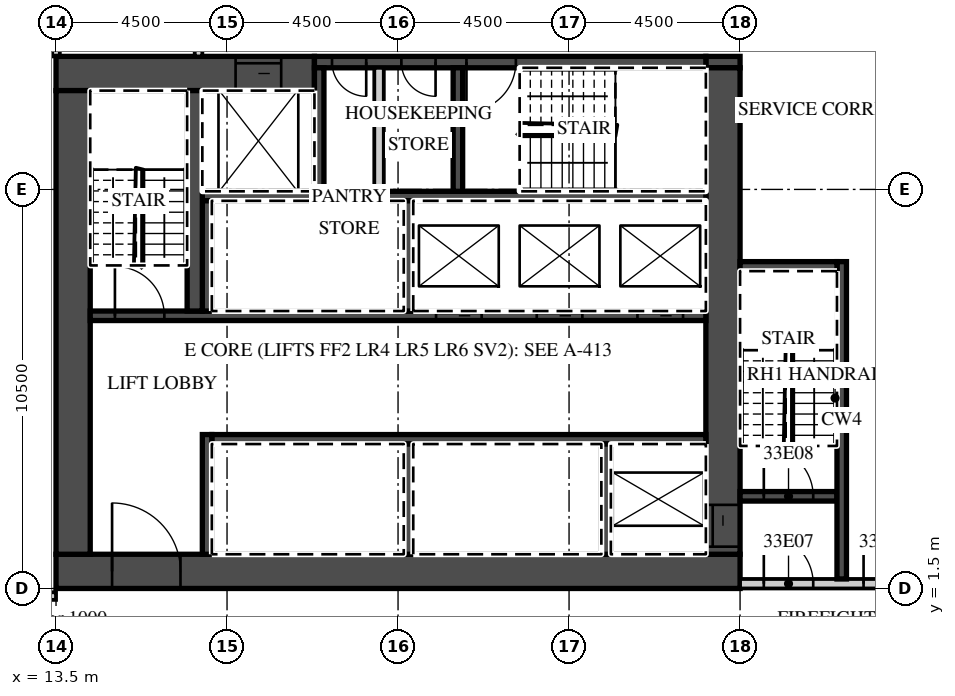
"""IFC4 building model, lengths in metres.
Left out: names, types, materials, properties, quantities, classifications, styles, units other than length and angle.
Written with IfcOpenShell. Run it as: python <this file> out.ifc"""

import sys

from ifc_helpers import new_model, si_unit, direction, frame, frame_2d, origin, place, context, subcontext, project, spatial, rectangle, extrude, element, fill, save


model = new_model("IFC4")
c1 = context("Model", 3, precision=1e-05, world=origin(), true_north=direction((0.0, 1.0)))
c2 = subcontext(c1, "Body", "Model", "MODEL_VIEW")
j1 = project(units=[si_unit("LENGTHUNIT", "METRE"), si_unit("PLANEANGLEUNIT", "RADIAN")], contexts=[c1])
p1 = place(None, origin())
s1 = spatial("IfcSite", under=j1, at=p1, CompositionType="ELEMENT")
p2 = place(p1, origin())
s2 = spatial("IfcBuilding", under=s1, at=p2, CompositionType="ELEMENT")
p3 = place(p2, frame((0.0, 0.0, 143.8)))
s3 = spatial("IfcBuildingStorey", under=s2, at=p3, CompositionType="ELEMENT", Elevation=143.8)
p4 = place(p3, frame((13.5, 15.5, 0.0), z_axis=(0.0, 0.0, 1.0), x_axis=(0.0, 1.0, 0.0)))
e1 = element("IfcWall", 1, at=p4, inside=s3, PredefinedType="PARTITIONING", context=c2, shape_type="SweptSolid", body=[
    extrude(rectangle(XDim=7.162, YDim=0.2, at=frame_2d((3.581, 0.0))), origin(), (0.0, 0.0, 1.0), 3.02),
])
p5 = place(p3, frame((-39.316, 1.3, 0.0), z_axis=(0.0, 0.0, 1.0), x_axis=(1.0, 0.0, 0.0)))
e2 = element("IfcWall", 2, at=p5, inside=s3, PredefinedType="PARTITIONING", context=c2, shape_type="SweptSolid", body=[
    extrude(rectangle(XDim=52.816, YDim=0.2, at=frame_2d((26.408, 0.0))), origin(), (0.0, 0.0, 1.0), 3.02),
])
p6 = place(p5, frame((0.15, 0.0, 0.0)))
e3 = element("IfcOpeningElement", 3, at=p6, cuts=e2, PredefinedType="OPENING", context=c2, shape_type="SweptSolid", body=[
    extrude(rectangle(XDim=0.9, YDim=2.1, at=frame_2d((0.45, 1.05))), frame((0.0, 0.11, 0.0), z_axis=(0.0, -1.0, 0.0), x_axis=(1.0, 0.0, 0.0)), (0.0, 0.0, 1.0), 0.22),
])
p7 = place(p5, frame((5.754, 0.0, 0.0)))
e4 = element("IfcOpeningElement", 4, at=p7, cuts=e2, PredefinedType="OPENING", context=c2, shape_type="SweptSolid", body=[
    extrude(rectangle(XDim=1.2, YDim=2.1, at=frame_2d((0.6, 1.05))), frame((0.0, 0.11, 0.0), z_axis=(0.0, -1.0, 0.0), x_axis=(1.0, 0.0, 0.0)), (0.0, 0.0, 1.0), 0.22),
])
p8 = place(p5, frame((14.754, 0.0, 0.0)))
e5 = element("IfcOpeningElement", 5, at=p8, cuts=e2, PredefinedType="OPENING", context=c2, shape_type="SweptSolid", body=[
    extrude(rectangle(XDim=1.2, YDim=2.1, at=frame_2d((0.6, 1.05))), frame((0.0, 0.11, 0.0), z_axis=(0.0, -1.0, 0.0), x_axis=(1.0, 0.0, 0.0)), (0.0, 0.0, 1.0), 0.22),
])
p9 = place(p5, frame((23.754, 0.0, 0.0)))
e6 = element("IfcOpeningElement", 6, at=p9, cuts=e2, PredefinedType="OPENING", context=c2, shape_type="SweptSolid", body=[
    extrude(rectangle(XDim=1.2, YDim=2.1, at=frame_2d((0.6, 1.05))), frame((0.0, 0.11, 0.0), z_axis=(0.0, -1.0, 0.0), x_axis=(1.0, 0.0, 0.0)), (0.0, 0.0, 1.0), 0.22),
])
p10 = place(p5, frame((35.678, 0.0, 0.0)))
e7 = element("IfcOpeningElement", 7, at=p10, cuts=e2, PredefinedType="OPENING", context=c2, shape_type="SweptSolid", body=[
    extrude(rectangle(XDim=1.2, YDim=2.1, at=frame_2d((0.6, 1.05))), frame((0.0, 0.11, 0.0), z_axis=(0.0, -1.0, 0.0), x_axis=(1.0, 0.0, 0.0)), (0.0, 0.0, 1.0), 0.22),
])
p11 = place(p5, frame((44.678, 0.0, 0.0)))
e8 = element("IfcOpeningElement", 8, at=p11, cuts=e2, PredefinedType="OPENING", context=c2, shape_type="SweptSolid", body=[
    extrude(rectangle(XDim=1.2, YDim=2.1, at=frame_2d((0.6, 1.05))), frame((0.0, 0.11, 0.0), z_axis=(0.0, -1.0, 0.0), x_axis=(1.0, 0.0, 0.0)), (0.0, 0.0, 1.0), 0.22),
])
p12 = place(p5, frame((51.241, 0.0, 0.0)))
e9 = element("IfcOpeningElement", 9, at=p12, cuts=e2, PredefinedType="OPENING", context=c2, shape_type="SweptSolid", body=[
    extrude(rectangle(XDim=1.0, YDim=2.1, at=frame_2d((0.5, 1.05))), frame((0.0, 0.11, 0.0), z_axis=(0.0, -1.0, 0.0), x_axis=(1.0, 0.0, 0.0)), (0.0, 0.0, 1.0), 0.22),
])
p13 = place(p3, frame((13.5, 1.95, 0.0), z_axis=(0.0, 0.0, 1.0), x_axis=(1.0, 0.0, 0.0)))
e10 = element("IfcWall", 10, at=p13, inside=s3, PredefinedType="SHEAR", context=c2, shape_type="SweptSolid", body=[
    extrude(rectangle(XDim=18.0, YDim=0.9, at=frame_2d((9.0, 0.0))), origin(), (0.0, 0.0, 1.0), 3.02),
])
p14 = place(p13, frame((1.475, 0.0, 0.0)))
e11 = element("IfcOpeningElement", 11, at=p14, cuts=e10, PredefinedType="OPENING", context=c2, shape_type="SweptSolid", body=[
    extrude(rectangle(XDim=1.8, YDim=2.1, at=frame_2d((0.9, 1.05))), frame((0.0, 0.46, 0.0), z_axis=(0.0, -1.0, 0.0), x_axis=(1.0, 0.0, 0.0)), (0.0, 0.0, 1.0), 0.92),
])
p15 = place(p3, frame((13.5, 15.05, 0.0), z_axis=(0.0, 0.0, 1.0), x_axis=(1.0, 0.0, 0.0)))
e12 = element("IfcWall", 12, at=p15, inside=s3, PredefinedType="SHEAR", context=c2, shape_type="SweptSolid", body=[
    extrude(rectangle(XDim=6.8, YDim=0.9, at=frame_2d((3.4, 0.0))), origin(), (0.0, 0.0, 1.0), 3.02),
])
p16 = place(p15, frame((4.725, 0.0, 0.0)))
e13 = element("IfcOpeningElement", 13, at=p16, cuts=e12, PredefinedType="OPENING", context=c2, shape_type="SweptSolid", body=[
    extrude(rectangle(XDim=1.2, YDim=2.1, at=frame_2d((0.6, 1.05))), frame((0.0, 0.46, 0.0), z_axis=(0.0, -1.0, 0.0), x_axis=(1.0, 0.0, 0.0)), (0.0, 0.0, 1.0), 0.92),
])
p17 = place(p3, frame((30.6, 15.35, 0.0), z_axis=(0.0, 0.0, 1.0), x_axis=(1.0, 0.0, 0.0)))
e14 = element("IfcWall", 14, at=p17, inside=s3, PredefinedType="SHEAR", context=c2, shape_type="SweptSolid", body=[
    extrude(rectangle(XDim=0.9, YDim=0.3, at=frame_2d((0.45, 0.0))), origin(), (0.0, 0.0, 1.0), 3.02),
])
p18 = place(p3, frame((20.3, 15.35, 0.0), z_axis=(0.0, 0.0, 1.0), x_axis=(1.0, 0.0, 0.0)))
e15 = element("IfcWall", 15, at=p18, inside=s3, PredefinedType="SHEAR", context=c2, shape_type="SweptSolid", body=[
    extrude(rectangle(XDim=10.3, YDim=0.3, at=frame_2d((5.15, 0.0))), origin(), (0.0, 0.0, 1.0), 3.02),
])
p19 = place(p18, frame((4.0, 0.0, 0.0)))
e16 = element("IfcOpeningElement", 16, at=p19, cuts=e15, PredefinedType="OPENING", context=c2, shape_type="SweptSolid", body=[
    extrude(rectangle(XDim=1.3, YDim=2.1, at=frame_2d((0.65, 1.05))), frame((0.0, 0.16, 0.0), z_axis=(0.0, -1.0, 0.0), x_axis=(1.0, 0.0, 0.0)), (0.0, 0.0, 1.0), 0.32),
])
p20 = place(p18, frame((2.288, 0.0, 0.0)))
e17 = element("IfcOpeningElement", 17, at=p20, cuts=e15, PredefinedType="OPENING", context=c2, shape_type="SweptSolid", body=[
    extrude(rectangle(XDim=0.9, YDim=2.1, at=frame_2d((0.45, 1.05))), frame((0.0, 0.16, 0.0), z_axis=(0.0, -1.0, 0.0), x_axis=(1.0, 0.0, 0.0)), (0.0, 0.0, 1.0), 0.32),
])
p21 = place(p18, frame((0.462, 0.0, 0.0)))
e18 = element("IfcOpeningElement", 18, at=p21, cuts=e15, PredefinedType="OPENING", context=c2, shape_type="SweptSolid", body=[
    extrude(rectangle(XDim=0.9, YDim=2.1, at=frame_2d((0.45, 1.05))), frame((0.0, 0.16, 0.0), z_axis=(0.0, -1.0, 0.0), x_axis=(1.0, 0.0, 0.0)), (0.0, 0.0, 1.0), 0.32),
])
p22 = place(p3, frame((31.05, 2.4, 0.0), z_axis=(0.0, 0.0, 1.0), x_axis=(0.0, 1.0, 0.0)))
e19 = element("IfcWall", 19, at=p22, inside=s3, PredefinedType="SHEAR", context=c2, shape_type="SweptSolid", body=[
    extrude(rectangle(XDim=12.8, YDim=0.9, at=frame_2d((6.4, 0.0))), origin(), (0.0, 0.0, 1.0), 3.02),
])
p23 = place(p22, frame((0.2, 0.0, 0.0)))
e20 = element("IfcOpeningElement", 20, at=p23, cuts=e19, PredefinedType="OPENING", context=c2, shape_type="SweptSolid", body=[
    extrude(rectangle(XDim=1.1, YDim=2.1, at=frame_2d((0.55, 1.05))), frame((0.0, 0.46, 0.0), z_axis=(0.0, -1.0, 0.0), x_axis=(1.0, 0.0, 0.0)), (0.0, 0.0, 1.0), 0.92),
])
p24 = place(p3, frame((13.95, 2.4, 0.0), z_axis=(0.0, 0.0, 1.0), x_axis=(0.0, 1.0, 0.0)))
e21 = element("IfcWall", 21, at=p24, inside=s3, PredefinedType="SHEAR", context=c2, shape_type="SweptSolid", body=[
    extrude(rectangle(XDim=12.2, YDim=0.9, at=frame_2d((6.1, 0.0))), origin(), (0.0, 0.0, 1.0), 3.02),
])
p25 = place(p3, frame((17.6, 5.425, 0.0), z_axis=(0.0, 0.0, 1.0), x_axis=(1.0, 0.0, 0.0)))
e22 = element("IfcWall", 22, at=p25, inside=s3, PredefinedType="SHEAR", context=c2, shape_type="SweptSolid", body=[
    extrude(rectangle(XDim=13.0, YDim=0.25, at=frame_2d((6.5, 0.0))), origin(), (0.0, 0.0, 1.0), 3.02),
])
p26 = place(p3, frame((17.475, 2.4, 0.0), z_axis=(0.0, 0.0, 1.0), x_axis=(0.0, 1.0, 0.0)))
e23 = element("IfcWall", 23, at=p26, inside=s3, PredefinedType="SHEAR", context=c2, shape_type="SweptSolid", body=[
    extrude(rectangle(XDim=3.15, YDim=0.25, at=frame_2d((1.575, 0.0))), origin(), (0.0, 0.0, 1.0), 3.02),
])
for number, where, z_axis, x_axis in (
    (24, (27.975, 2.4, 0.0), (0.0, 0.0, 1.0), (0.0, 1.0, 0.0)),
    (25, (22.775, 2.4, 0.0), (0.0, 0.0, 1.0), (0.0, 1.0, 0.0)),
):
    element("IfcWall", number, at=place(p3, frame(where, z_axis=z_axis, x_axis=x_axis)), inside=s3, PredefinedType="SHEAR", context=c2, shape_type="SweptSolid", body=[
        extrude(rectangle(XDim=2.9, YDim=0.25, at=frame_2d((1.45, 0.0))), origin(), (0.0, 0.0, 1.0), 3.02),
    ])
p27 = place(p3, frame((14.4, 8.675, 0.0), z_axis=(0.0, 0.0, 1.0), x_axis=(1.0, 0.0, 0.0)))
e26 = element("IfcWall", 26, at=p27, inside=s3, PredefinedType="SHEAR", context=c2, shape_type="SweptSolid", body=[
    extrude(rectangle(XDim=16.2, YDim=0.25, at=frame_2d((8.1, 0.0))), origin(), (0.0, 0.0, 1.0), 3.02),
])
p28 = place(p27, frame((14.4, 0.0, 0.0)))
e27 = element("IfcOpeningElement", 27, at=p28, cuts=e26, PredefinedType="OPENING", context=c2, shape_type="SweptSolid", body=[
    extrude(rectangle(XDim=1.2, YDim=2.1, at=frame_2d((0.6, 1.05))), frame((0.0, 0.135, 0.0), z_axis=(0.0, -1.0, 0.0), x_axis=(1.0, 0.0, 0.0)), (0.0, 0.0, 1.0), 0.27),
])
p29 = place(p27, frame((11.75, 0.0, 0.0)))
e28 = element("IfcOpeningElement", 28, at=p29, cuts=e26, PredefinedType="OPENING", context=c2, shape_type="SweptSolid", body=[
    extrude(rectangle(XDim=1.2, YDim=2.1, at=frame_2d((0.6, 1.05))), frame((0.0, 0.135, 0.0), z_axis=(0.0, -1.0, 0.0), x_axis=(1.0, 0.0, 0.0)), (0.0, 0.0, 1.0), 0.27),
])
p30 = place(p27, frame((9.1, 0.0, 0.0)))
e29 = element("IfcOpeningElement", 29, at=p30, cuts=e26, PredefinedType="OPENING", context=c2, shape_type="SweptSolid", body=[
    extrude(rectangle(XDim=1.2, YDim=2.1, at=frame_2d((0.6, 1.05))), frame((0.0, 0.135, 0.0), z_axis=(0.0, -1.0, 0.0), x_axis=(1.0, 0.0, 0.0)), (0.0, 0.0, 1.0), 0.27),
])
p31 = place(p27, frame((0.65, 0.0, 0.0)))
e30 = element("IfcOpeningElement", 30, at=p31, cuts=e26, PredefinedType="OPENING", context=c2, shape_type="SweptSolid", body=[
    extrude(rectangle(XDim=1.3, YDim=2.1, at=frame_2d((0.65, 1.05))), frame((0.0, 0.135, 0.0), z_axis=(0.0, -1.0, 0.0), x_axis=(1.0, 0.0, 0.0)), (0.0, 0.0, 1.0), 0.27),
])
p32 = place(p3, frame((17.35, 11.825, 0.0), z_axis=(0.0, 0.0, 1.0), x_axis=(1.0, 0.0, 0.0)))
e31 = element("IfcWall", 31, at=p32, inside=s3, PredefinedType="SHEAR", context=c2, shape_type="SweptSolid", body=[
    extrude(rectangle(XDim=13.25, YDim=0.25, at=frame_2d((6.625, 0.0))), origin(), (0.0, 0.0, 1.0), 3.02),
])
for number, where, z_axis, x_axis in (
    (32, (17.475, 8.8, 0.0), (0.0, 0.0, 1.0), (0.0, 1.0, 0.0)),
    (33, (22.775, 8.8, 0.0), (0.0, 0.0, 1.0), (0.0, 1.0, 0.0)),
):
    element("IfcWall", number, at=place(p3, frame(where, z_axis=z_axis, x_axis=x_axis)), inside=s3, PredefinedType="SHEAR", context=c2, shape_type="SweptSolid", body=[
        extrude(rectangle(XDim=2.9, YDim=0.25, at=frame_2d((1.45, 0.0))), origin(), (0.0, 0.0, 1.0), 3.02),
    ])
p33 = place(p3, frame((17.15, 8.8, 0.0), z_axis=(0.0, 0.0, 1.0), x_axis=(0.0, 1.0, 0.0)))
e34 = element("IfcWall", 34, at=p33, inside=s3, PredefinedType="SHEAR", context=c2, shape_type="SweptSolid", body=[
    extrude(rectangle(XDim=5.8, YDim=0.4, at=frame_2d((2.9, 0.0))), origin(), (0.0, 0.0, 1.0), 3.02),
])
for number, where, z_axis, x_axis in (
    (35, (20.425, 11.95, 0.0), (0.0, 0.0, 1.0), (0.0, 1.0, 0.0)),
    (36, (24.075, 11.95, 0.0), (0.0, 0.0, 1.0), (0.0, 1.0, 0.0)),
):
    element("IfcWall", number, at=place(p3, frame(where, z_axis=z_axis, x_axis=x_axis)), inside=s3, PredefinedType="SHEAR", context=c2, shape_type="SweptSolid", body=[
        extrude(rectangle(XDim=3.25, YDim=0.25, at=frame_2d((1.625, 0.0))), origin(), (0.0, 0.0, 1.0), 3.02),
    ])
p34 = place(p3, frame((22.0, 11.95, 0.0), z_axis=(0.0, 0.0, 1.0), x_axis=(0.0, 1.0, 0.0)))
e37 = element("IfcWall", 37, at=p34, inside=s3, PredefinedType="PARTITIONING", context=c2, shape_type="SweptSolid", body=[
    extrude(rectangle(XDim=3.25, YDim=0.25, at=frame_2d((1.625, 0.0))), origin(), (0.0, 0.0, 1.0), 3.02),
])
p35 = place(p3, frame((31.5, 1.625, 0.0), z_axis=(0.0, 0.0, 1.0), x_axis=(1.0, 0.0, 0.0)))
e38 = element("IfcWall", 38, at=p35, inside=s3, PredefinedType="PARTITIONING", context=c2, shape_type="SweptSolid", body=[
    extrude(rectangle(XDim=15.65, YDim=0.25, at=frame_2d((7.825, 0.0))), origin(), (0.0, 0.0, 1.0), 3.02),
])
p36 = place(p35, frame((0.625, 0.0, 0.0)))
e39 = element("IfcOpeningElement", 39, at=p36, cuts=e38, PredefinedType="OPENING", context=c2, shape_type="SweptSolid", body=[
    extrude(rectangle(XDim=1.3, YDim=2.1, at=frame_2d((0.65, 1.05))), frame((0.0, 0.135, 0.0), z_axis=(0.0, -1.0, 0.0), x_axis=(1.0, 0.0, 0.0)), (0.0, 0.0, 1.0), 0.27),
])
p37 = place(p35, frame((3.25, 0.0, 0.0)))
e40 = element("IfcOpeningElement", 40, at=p37, cuts=e38, PredefinedType="OPENING", context=c2, shape_type="SweptSolid", body=[
    extrude(rectangle(XDim=1.1, YDim=2.1, at=frame_2d((0.55, 1.05))), frame((0.0, 0.135, 0.0), z_axis=(0.0, -1.0, 0.0), x_axis=(1.0, 0.0, 0.0)), (0.0, 0.0, 1.0), 0.27),
])
p38 = place(p3, frame((31.5, 3.925, 0.0), z_axis=(0.0, 0.0, 1.0), x_axis=(1.0, 0.0, 0.0)))
e41 = element("IfcWall", 41, at=p38, inside=s3, PredefinedType="SHEAR", context=c2, shape_type="SweptSolid", body=[
    extrude(rectangle(XDim=2.55, YDim=0.25, at=frame_2d((1.275, 0.0))), origin(), (0.0, 0.0, 1.0), 3.02),
])
p39 = place(p38, frame((0.625, 0.0, 0.0)))
e42 = element("IfcOpeningElement", 42, at=p39, cuts=e41, PredefinedType="OPENING", context=c2, shape_type="SweptSolid", body=[
    extrude(rectangle(XDim=1.3, YDim=2.1, at=frame_2d((0.65, 1.05))), frame((0.0, 0.135, 0.0), z_axis=(0.0, -1.0, 0.0), x_axis=(1.0, 0.0, 0.0)), (0.0, 0.0, 1.0), 0.27),
])
p40 = place(p3, frame((34.175, 1.75, 0.0), z_axis=(0.0, 0.0, 1.0), x_axis=(0.0, 1.0, 0.0)))
e43 = element("IfcWall", 43, at=p40, inside=s3, PredefinedType="SHEAR", context=c2, shape_type="SweptSolid", body=[
    extrude(rectangle(XDim=8.35, YDim=0.25, at=frame_2d((4.175, 0.0))), origin(), (0.0, 0.0, 1.0), 3.02),
])
p41 = place(p3, frame((31.5, 9.975, 0.0), z_axis=(0.0, 0.0, 1.0), x_axis=(1.0, 0.0, 0.0)))
e44 = element("IfcWall", 44, at=p41, inside=s3, PredefinedType="SHEAR", context=c2, shape_type="SweptSolid", body=[
    extrude(rectangle(XDim=2.55, YDim=0.25, at=frame_2d((1.275, 0.0))), origin(), (0.0, 0.0, 1.0), 3.02),
])
p42 = place(p3, frame((17.25, 15.5, 0.0), z_axis=(0.0, 0.0, 1.0), x_axis=(0.0, 1.0, 0.0)))
e45 = element("IfcWall", 45, at=p42, inside=s3, PredefinedType="PARTITIONING", context=c2, shape_type="SweptSolid", body=[
    extrude(rectangle(XDim=2.2, YDim=0.2, at=frame_2d((1.1, 0.0))), origin(), (0.0, 0.0, 1.0), 3.02),
])
p43 = place(p28, origin())
e46 = element("IfcDoor", 46, at=p43, inside=s3, OperationType="SLIDING_TO_LEFT", PredefinedType="DOOR", context=c2, shape_type="SweptSolid", body=[
    extrude(rectangle(XDim=1.2, YDim=2.1, at=frame_2d((0.6, 1.05))), frame((0.0, 0.025, 0.0), z_axis=(0.0, -1.0, 0.0), x_axis=(1.0, 0.0, 0.0)), (0.0, 0.0, 1.0), 0.05),
])
fill(e27, e46)
p44 = place(p29, origin())
e47 = element("IfcDoor", 47, at=p44, inside=s3, OperationType="SLIDING_TO_RIGHT", PredefinedType="DOOR", context=c2, shape_type="SweptSolid", body=[
    extrude(rectangle(XDim=1.2, YDim=2.1, at=frame_2d((0.6, 1.05))), frame((0.0, 0.025, 0.0), z_axis=(0.0, -1.0, 0.0), x_axis=(1.0, 0.0, 0.0)), (0.0, 0.0, 1.0), 0.05),
])
fill(e28, e47)
p45 = place(p30, origin())
e48 = element("IfcDoor", 48, at=p45, inside=s3, OperationType="SLIDING_TO_RIGHT", PredefinedType="DOOR", context=c2, shape_type="SweptSolid", body=[
    extrude(rectangle(XDim=1.2, YDim=2.1, at=frame_2d((0.6, 1.05))), frame((0.0, 0.025, 0.0), z_axis=(0.0, -1.0, 0.0), x_axis=(1.0, 0.0, 0.0)), (0.0, 0.0, 1.0), 0.05),
])
fill(e29, e48)
p46 = place(p16, origin())
e49 = element("IfcDoor", 49, at=p46, inside=s3, OperationType="SLIDING_TO_LEFT", PredefinedType="DOOR", context=c2, shape_type="SweptSolid", body=[
    extrude(rectangle(XDim=1.2, YDim=2.1, at=frame_2d((0.6, 1.05))), frame((0.0, 0.025, 0.0), z_axis=(0.0, -1.0, 0.0), x_axis=(1.0, 0.0, 0.0)), (0.0, 0.0, 1.0), 0.05),
])
fill(e13, e49)
p47 = place(p23, origin())
e50 = element("IfcDoor", 50, at=p47, inside=s3, OperationType="SLIDING_TO_LEFT", PredefinedType="DOOR", context=c2, shape_type="SweptSolid", body=[
    extrude(rectangle(XDim=1.1, YDim=2.1, at=frame_2d((0.55, 1.05))), frame((0.0, 0.025, 0.0), z_axis=(0.0, -1.0, 0.0), x_axis=(1.0, 0.0, 0.0)), (0.0, 0.0, 1.0), 0.05),
])
fill(e20, e50)
p48 = place(p14, origin())
e51 = element("IfcDoor", 51, at=p48, inside=s3, OperationType="DOUBLE_DOOR_DOUBLE_SWING", PredefinedType="DOOR", context=c2, shape_type="SweptSolid", body=[
    extrude(rectangle(XDim=1.8, YDim=2.1, at=frame_2d((0.9, 1.05))), frame((0.0, 0.025, 0.0), z_axis=(0.0, -1.0, 0.0), x_axis=(1.0, 0.0, 0.0)), (0.0, 0.0, 1.0), 0.05),
])
fill(e11, e51)
p49 = place(p36, origin())
e52 = element("IfcDoor", 52, at=p49, inside=s3, OperationType="SINGLE_SWING_LEFT", PredefinedType="DOOR", context=c2, shape_type="SweptSolid", body=[
    extrude(rectangle(XDim=1.3, YDim=2.1, at=frame_2d((0.65, 1.05))), frame((0.0, 0.025, 0.0), z_axis=(0.0, -1.0, 0.0), x_axis=(1.0, 0.0, 0.0)), (0.0, 0.0, 1.0), 0.05),
])
fill(e39, e52)
p50 = place(p39, origin())
e53 = element("IfcDoor", 53, at=p50, inside=s3, OperationType="SINGLE_SWING_LEFT", PredefinedType="DOOR", context=c2, shape_type="SweptSolid", body=[
    extrude(rectangle(XDim=1.3, YDim=2.1, at=frame_2d((0.65, 1.05))), frame((0.0, 0.025, 0.0), z_axis=(0.0, -1.0, 0.0), x_axis=(1.0, 0.0, 0.0)), (0.0, 0.0, 1.0), 0.05),
])
fill(e42, e53)
p51 = place(p37, origin())
e54 = element("IfcDoor", 54, at=p51, inside=s3, OperationType="SINGLE_SWING_LEFT", PredefinedType="DOOR", context=c2, shape_type="SweptSolid", body=[
    extrude(rectangle(XDim=1.1, YDim=2.1, at=frame_2d((0.55, 1.05))), frame((0.0, 0.025, 0.0), z_axis=(0.0, -1.0, 0.0), x_axis=(1.0, 0.0, 0.0)), (0.0, 0.0, 1.0), 0.05),
])
fill(e40, e54)
p52 = place(p31, origin())
e55 = element("IfcDoor", 55, at=p52, inside=s3, OperationType="SINGLE_SWING_LEFT", PredefinedType="DOOR", context=c2, shape_type="SweptSolid", body=[
    extrude(rectangle(XDim=1.3, YDim=2.1, at=frame_2d((0.65, 1.05))), frame((0.0, 0.025, 0.0), z_axis=(0.0, -1.0, 0.0), x_axis=(1.0, 0.0, 0.0)), (0.0, 0.0, 1.0), 0.05),
])
fill(e30, e55)
p53 = place(p19, origin())
e56 = element("IfcDoor", 56, at=p53, inside=s3, OperationType="SINGLE_SWING_LEFT", PredefinedType="DOOR", context=c2, shape_type="SweptSolid", body=[
    extrude(rectangle(XDim=1.3, YDim=2.1, at=frame_2d((0.65, 1.05))), frame((0.0, 0.025, 0.0), z_axis=(0.0, -1.0, 0.0), x_axis=(1.0, 0.0, 0.0)), (0.0, 0.0, 1.0), 0.05),
])
fill(e16, e56)
p54 = place(p20, origin())
e57 = element("IfcDoor", 57, at=p54, inside=s3, OperationType="SINGLE_SWING_RIGHT", PredefinedType="DOOR", context=c2, shape_type="SweptSolid", body=[
    extrude(rectangle(XDim=0.9, YDim=2.1, at=frame_2d((0.45, 1.05))), frame((0.0, 0.025, 0.0), z_axis=(0.0, -1.0, 0.0), x_axis=(1.0, 0.0, 0.0)), (0.0, 0.0, 1.0), 0.05),
])
fill(e17, e57)
p55 = place(p21, origin())
e58 = element("IfcDoor", 58, at=p55, inside=s3, OperationType="SINGLE_SWING_RIGHT", PredefinedType="DOOR", context=c2, shape_type="SweptSolid", body=[
    extrude(rectangle(XDim=0.9, YDim=2.1, at=frame_2d((0.45, 1.05))), frame((0.0, 0.025, 0.0), z_axis=(0.0, -1.0, 0.0), x_axis=(1.0, 0.0, 0.0)), (0.0, 0.0, 1.0), 0.05),
])
fill(e18, e58)
save(model, sys.argv[1])
